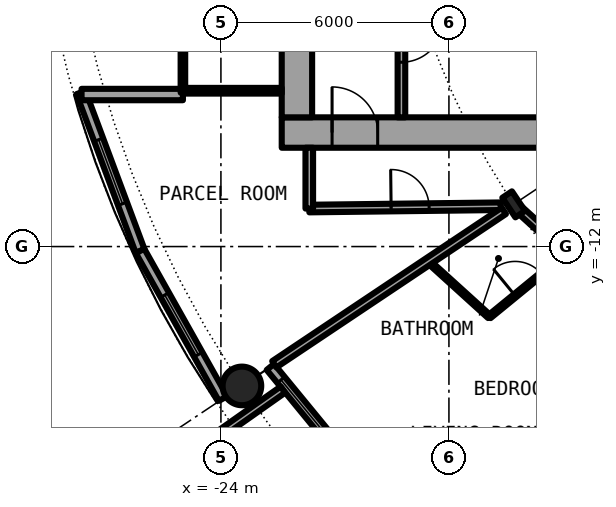
"""IFC4 building model, lengths in metres.
Left out: names, types, materials, properties, quantities, classifications, styles, units other than length and angle.
Written with IfcOpenShell. Run it as: python <this file> out.ifc"""

import sys

from ifc_helpers import new_model, si_unit, direction, frame, frame_2d, origin, origin_2d, place, context, subcontext, project, spatial, rectangle, hollow_circle, i_section, extrude, element, fill, save


model = new_model("IFC4")
c1 = context("Model", 3, precision=1e-05, world=origin(), true_north=direction((0.0, 1.0)))
c2 = subcontext(c1, "Body", "Model", "MODEL_VIEW")
j1 = project(units=[si_unit("LENGTHUNIT", "METRE"), si_unit("PLANEANGLEUNIT", "RADIAN")], contexts=[c1])
p1 = place(None, origin())
s1 = spatial("IfcSite", under=j1, at=p1, CompositionType="ELEMENT")
p2 = place(p1, origin())
s2 = spatial("IfcBuilding", under=s1, at=p2, CompositionType="ELEMENT")
p3 = place(p2, frame((0.0, 0.0, 28.9)))
s3 = spatial("IfcBuildingStorey", under=s2, at=p3, CompositionType="ELEMENT", Elevation=28.9)
p4 = place(p3, frame((-23.448, -15.667, 0.0), z_axis=(0.0, 0.0, 1.0), x_axis=(1.0, 0.0, 0.0)))
e1 = element("IfcColumn", 1, at=p4, inside=s3, PredefinedType="COLUMN", context=c2, shape_type="SweptSolid", body=[
    extrude(hollow_circle(Radius=0.508, WallThickness=0.05, at=origin_2d()), origin(), (0.0, 0.0, 1.0), 3.05),
])
p5 = place(p3, frame((-16.297, -10.889, 0.0), z_axis=(0.0, 0.0, 1.0), x_axis=(-0.831469612303, -0.55557023302, 0.0)))
e2 = element("IfcColumn", 2, at=p5, inside=s3, PredefinedType="COLUMN", context=c2, shape_type="SweptSolid", body=[
    extrude(i_section(OverallWidth=0.305, OverallDepth=0.62, WebThickness=0.021, FlangeThickness=0.04, FilletRadius=0.027, at=origin_2d()), origin(), (0.0, 0.0, 1.0), 3.05),
])
p6 = place(p3, frame((-22.699, -15.167, 0.0), z_axis=(0.0, 0.0, 1.0), x_axis=(0.634382322723, -0.773019449054, 0.0)))
e3 = element("IfcWall", 3, at=p6, inside=s3, PredefinedType="SOLIDWALL", context=c2, shape_type="SweptSolid", body=[
    extrude(rectangle(XDim=5.352, YDim=0.25, at=frame_2d((2.676, 0.0))), origin(), (0.0, 0.0, 1.0), 2.7),
])
p7 = place(p6, frame((0.441, 0.0, 0.3)))
e4 = element("IfcOpeningElement", 4, at=p7, cuts=e3, PredefinedType="OPENING", context=c2, shape_type="SweptSolid", body=[
    extrude(rectangle(XDim=1.8, YDim=2.1, at=frame_2d((0.9, 1.05))), frame((0.0, 0.135, 0.0), z_axis=(0.0, -1.0, 0.0), x_axis=(1.0, 0.0, 0.0)), (0.0, 0.0, 1.0), 0.27),
])
p8 = place(p6, frame((3.51, 0.0, 0.0)))
e5 = element("IfcOpeningElement", 5, at=p8, cuts=e3, PredefinedType="OPENING", context=c2, shape_type="SweptSolid", body=[
    extrude(rectangle(XDim=1.0, YDim=2.2, at=frame_2d((0.5, 1.1))), frame((0.0, 0.135, 0.0), z_axis=(0.0, -1.0, 0.0), x_axis=(1.0, 0.0, 0.0)), (0.0, 0.0, 1.0), 0.27),
])
p9 = place(p3, frame((-22.37, -15.765, -0.03), z_axis=(0.0, 0.0, 1.0), x_axis=(-0.817256123454, -0.576274612209, 0.0)))
e6 = element("IfcWall", 6, at=p9, inside=s3, PredefinedType="SOLIDWALL", context=c2, shape_type="SweptSolid", body=[
    extrude(rectangle(XDim=2.933, YDim=0.2, at=frame_2d((1.466, 0.0))), origin(), (0.0, 0.0, 1.0), 2.73),
])
p10 = place(p3, frame((-27.682, -7.945, 0.0), z_axis=(0.0, 0.0, 1.0), x_axis=(0.349247811493, -0.937030397675, 0.0)))
e7 = element("IfcWall", 7, at=p10, inside=s3, PredefinedType="SOLIDWALL", context=c2, shape_type="SweptSolid", body=[
    extrude(rectangle(XDim=4.452, YDim=0.25, at=frame_2d((2.226, 0.0))), origin(), (0.0, 0.0, 1.0), 2.7),
])
p11 = place(p10, frame((1.327, 0.0, 0.3)))
e8 = element("IfcOpeningElement", 8, at=p11, cuts=e7, PredefinedType="OPENING", context=c2, shape_type="SweptSolid", body=[
    extrude(rectangle(XDim=1.8, YDim=2.1, at=frame_2d((0.9, 1.05))), frame((0.0, 0.135, 0.0), z_axis=(0.0, -1.0, 0.0), x_axis=(1.0, 0.0, 0.0)), (0.0, 0.0, 1.0), 0.27),
])
p12 = place(p3, frame((-26.127, -12.117, 0.0), z_axis=(0.0, 0.0, 1.0), x_axis=(0.489696356642, -0.871893042919, 0.0)))
e9 = element("IfcWall", 9, at=p12, inside=s3, PredefinedType="SOLIDWALL", context=c2, shape_type="SweptSolid", body=[
    extrude(rectangle(XDim=4.454, YDim=0.25, at=frame_2d((2.227, 0.0))), origin(), (0.0, 0.0, 1.0), 2.7),
])
p13 = place(p12, frame((1.327, 0.0, 0.3)))
e10 = element("IfcOpeningElement", 10, at=p13, cuts=e9, PredefinedType="OPENING", context=c2, shape_type="SweptSolid", body=[
    extrude(rectangle(XDim=1.8, YDim=2.1, at=frame_2d((0.9, 1.05))), frame((0.0, 0.135, 0.0), z_axis=(0.0, -1.0, 0.0), x_axis=(1.0, 0.0, 0.0)), (0.0, 0.0, 1.0), 0.27),
])
p14 = place(p3, frame((-25.0, -8.0, 0.0), z_axis=(0.0, 0.0, 1.0), x_axis=(-1.0, 0.0, 0.0)))
e11 = element("IfcWall", 11, at=p14, inside=s3, PredefinedType="SOLIDWALL", context=c2, shape_type="SweptSolid", body=[
    extrude(rectangle(XDim=2.667, YDim=0.3, at=frame_2d((1.333, 0.0))), origin(), (0.0, 0.0, 1.0), 2.7),
])
p15 = place(p3, frame((-22.4, -9.0, 0.0), z_axis=(0.0, 0.0, 1.0), x_axis=(1.0, 0.0, 0.0)))
e12 = element("IfcWall", 12, at=p15, inside=s3, PredefinedType="SHEAR", context=c2, shape_type="SweptSolid", body=[
    extrude(rectangle(XDim=14.2, YDim=0.8, at=frame_2d((7.1, 0.0))), origin(), (0.0, 0.0, 1.0), 3.05),
])
p16 = place(p15, frame((1.325, 0.0, 0.0)))
e13 = element("IfcOpeningElement", 13, at=p16, cuts=e12, PredefinedType="OPENING", context=c2, shape_type="SweptSolid", body=[
    extrude(rectangle(XDim=1.2, YDim=2.3, at=frame_2d((0.6, 1.15))), frame((0.0, 0.41, 0.0), z_axis=(0.0, -1.0, 0.0), x_axis=(1.0, 0.0, 0.0)), (0.0, 0.0, 1.0), 0.82),
])
p17 = place(p3, frame((-22.0, -8.6, 0.0), z_axis=(0.0, 0.0, 1.0), x_axis=(0.0, 1.0, 0.0)))
e14 = element("IfcWall", 14, at=p17, inside=s3, PredefinedType="SHEAR", context=c2, shape_type="SweptSolid", body=[
    extrude(rectangle(XDim=17.2, YDim=0.8, at=frame_2d((8.6, 0.0))), origin(), (0.0, 0.0, 1.0), 3.05),
])
p18 = place(p17, frame((7.7, 0.0, 0.0)))
e15 = element("IfcOpeningElement", 15, at=p18, cuts=e14, PredefinedType="OPENING", context=c2, shape_type="SweptSolid", body=[
    extrude(rectangle(XDim=1.8, YDim=2.3, at=frame_2d((0.9, 1.15))), frame((0.0, 0.41, 0.0), z_axis=(0.0, -1.0, 0.0), x_axis=(1.0, 0.0, 0.0)), (0.0, 0.0, 1.0), 0.82),
])
p19 = place(p3, frame((-19.25, -1.575, 0.0), z_axis=(0.0, 0.0, 1.0), x_axis=(0.0, -1.0, 0.0)))
e16 = element("IfcWall", 16, at=p19, inside=s3, PredefinedType="SOLIDWALL", context=c2, shape_type="SweptSolid", body=[
    extrude(rectangle(XDim=7.025, YDim=0.2, at=frame_2d((3.513, 0.0))), origin(), (0.0, 0.0, 1.0), 2.7),
])
p20 = place(p19, frame((4.475, 0.0, 0.0)))
e17 = element("IfcOpeningElement", 17, at=p20, cuts=e16, PredefinedType="OPENING", context=c2, shape_type="SweptSolid", body=[
    extrude(rectangle(XDim=1.1, YDim=2.3, at=frame_2d((0.55, 1.15))), frame((0.0, 0.11, 0.0), z_axis=(0.0, -1.0, 0.0), x_axis=(1.0, 0.0, 0.0)), (0.0, 0.0, 1.0), 0.22),
])
p21 = place(p3, frame((-22.4, -7.9, 0.0), z_axis=(0.0, 0.0, 1.0), x_axis=(-1.0, 0.0, 0.0)))
e18 = element("IfcWall", 18, at=p21, inside=s3, PredefinedType="PARTITIONING", context=c2, shape_type="SweptSolid", body=[
    extrude(rectangle(XDim=2.54, YDim=0.15, at=frame_2d((1.27, 0.0))), origin(), (0.0, 0.0, 1.0), 2.7),
])
p22 = place(p3, frame((-25.0, 7.95, 0.0), z_axis=(0.0, 0.0, 1.0), x_axis=(0.0, -1.0, 0.0)))
e19 = element("IfcWall", 19, at=p22, inside=s3, PredefinedType="PARTITIONING", context=c2, shape_type="SweptSolid", body=[
    extrude(rectangle(XDim=15.9, YDim=0.12, at=frame_2d((7.95, 0.0))), origin(), (0.0, 0.0, 1.0), 2.7),
])
p23 = place(p22, frame((0.95, 0.0, 0.1)))
e20 = element("IfcOpeningElement", 20, at=p23, cuts=e19, PredefinedType="OPENING", context=c2, shape_type="SweptSolid", body=[
    extrude(rectangle(XDim=14.0, YDim=2.35, at=frame_2d((7.0, 1.175))), frame((0.0, 0.07, 0.0), z_axis=(0.0, -1.0, 0.0), x_axis=(1.0, 0.0, 0.0)), (0.0, 0.0, 1.0), 0.14),
])
p24 = place(p3, frame((-18.542, -12.389, 0.0), z_axis=(0.0, 0.0, 1.0), x_axis=(0.740836325503, -0.671685595212, 0.0)))
e21 = element("IfcWall", 21, at=p24, inside=s3, PredefinedType="PARTITIONING", context=c2, shape_type="SweptSolid", body=[
    extrude(rectangle(XDim=2.168, YDim=0.1, at=frame_2d((1.084, 0.0))), origin(), (0.0, 0.0, 1.0), 2.7),
])
p25 = place(p3, frame((-16.18, -10.994, 0.0), z_axis=(0.0, 0.0, 1.0), x_axis=(0.74089212117, -0.671624050186, 0.0)))
e22 = element("IfcWall", 22, at=p25, inside=s3, PredefinedType="PARTITIONING", context=c2, shape_type="SweptSolid", body=[
    extrude(rectangle(XDim=9.368, YDim=0.2, at=frame_2d((4.684, 0.0))), origin(), (0.0, 0.0, 1.0), 2.38),
])
p26 = place(p25, frame((3.153, 0.0, 0.0)))
e23 = element("IfcOpeningElement", 23, at=p26, cuts=e22, PredefinedType="OPENING", context=c2, shape_type="SweptSolid", body=[
    extrude(rectangle(XDim=1.0, YDim=2.3, at=frame_2d((0.5, 1.15))), frame((0.0, 0.11, 0.0), z_axis=(0.0, -1.0, 0.0), x_axis=(1.0, 0.0, 0.0)), (0.0, 0.0, 1.0), 0.22),
])
p27 = place(p3, frame((-21.675, -11.0, 0.0), z_axis=(0.0, 0.0, 1.0), x_axis=(0.999926652916, 0.012111514691, 0.0)))
e24 = element("IfcWall", 24, at=p27, inside=s3, PredefinedType="PARTITIONING", context=c2, shape_type="SweptSolid", body=[
    extrude(rectangle(XDim=5.04, YDim=0.2, at=frame_2d((2.52, 0.0))), origin(), (0.0, 0.0, 1.0), 2.7),
])
p28 = place(p27, frame((2.154, 0.0, 0.0)))
e25 = element("IfcOpeningElement", 25, at=p28, cuts=e24, PredefinedType="OPENING", context=c2, shape_type="SweptSolid", body=[
    extrude(rectangle(XDim=1.0, YDim=2.3, at=frame_2d((0.5, 1.15))), frame((0.0, 0.11, 0.0), z_axis=(0.0, -1.0, 0.0), x_axis=(1.0, 0.0, 0.0)), (0.0, 0.0, 1.0), 0.22),
])
p29 = place(p3, frame((-22.595, -15.097, 0.0), z_axis=(0.0, 0.0, 1.0), x_axis=(0.831465568067, 0.555576285599, 0.0)))
e26 = element("IfcWall", 26, at=p29, inside=s3, PredefinedType="PARTITIONING", context=c2, shape_type="SweptSolid", body=[
    extrude(rectangle(XDim=7.264, YDim=0.2, at=frame_2d((3.632, 0.0))), origin(), (0.0, 0.0, 1.0), 2.7),
])
p30 = place(p3, frame((-17.219, -21.023, 0.0), z_axis=(0.0, 0.0, 1.0), x_axis=(0.633664062855, 0.773608334654, 0.0)))
e27 = element("IfcWall", 27, at=p30, inside=s3, PredefinedType="PARTITIONING", context=c2, shape_type="SweptSolid", body=[
    extrude(rectangle(XDim=8.138, YDim=0.1, at=frame_2d((4.069, 0.0))), origin(), (0.0, 0.0, 1.0), 2.7),
])
p31 = place(p30, frame((6.377, 0.0, 0.0)))
e28 = element("IfcOpeningElement", 28, at=p31, cuts=e27, PredefinedType="OPENING", context=c2, shape_type="SweptSolid", body=[
    extrude(rectangle(XDim=0.9, YDim=2.3, at=frame_2d((0.45, 1.15))), frame((0.0, 0.06, 0.0), z_axis=(0.0, -1.0, 0.0), x_axis=(1.0, 0.0, 0.0)), (0.0, 0.0, 1.0), 0.12),
])
p32 = place(p30, frame((2.308, 0.0, 0.0)))
e29 = element("IfcOpeningElement", 29, at=p32, cuts=e27, PredefinedType="OPENING", context=c2, shape_type="SweptSolid", body=[
    extrude(rectangle(XDim=0.9, YDim=2.3, at=frame_2d((0.45, 1.15))), frame((0.0, 0.06, 0.0), z_axis=(0.0, -1.0, 0.0), x_axis=(1.0, 0.0, 0.0)), (0.0, 0.0, 1.0), 0.12),
])
p33 = place(p3, frame((-16.936, -13.845, 0.0), z_axis=(0.0, 0.0, 1.0), x_axis=(0.774162545943, 0.632986850147, 0.0)))
e30 = element("IfcWall", 30, at=p33, inside=s3, PredefinedType="PARTITIONING", context=c2, shape_type="SweptSolid", body=[
    extrude(rectangle(XDim=2.649, YDim=0.1, at=frame_2d((1.325, 0.0))), origin(), (0.0, 0.0, 1.0), 2.7),
])
p34 = place(p33, frame((0.875, 0.0, 0.0)))
e31 = element("IfcOpeningElement", 31, at=p34, cuts=e30, PredefinedType="OPENING", context=c2, shape_type="SweptSolid", body=[
    extrude(rectangle(XDim=0.9, YDim=2.3, at=frame_2d((0.45, 1.15))), frame((0.0, 0.06, 0.0), z_axis=(0.0, -1.0, 0.0), x_axis=(1.0, 0.0, 0.0)), (0.0, 0.0, 1.0), 0.12),
])
p35 = place(p3, frame((-21.675, -11.0, 0.0), z_axis=(0.0, 0.0, 1.0), x_axis=(0.0, 1.0, 0.0)))
e32 = element("IfcWall", 32, at=p35, inside=s3, PredefinedType="PARTITIONING", context=c2, shape_type="SweptSolid", body=[
    extrude(rectangle(XDim=1.6, YDim=0.2, at=frame_2d((0.8, 0.0))), origin(), (0.0, 0.0, 1.0), 2.7),
])
p36 = place(p7, origin())
e33 = element("IfcWindow", 33, at=p36, inside=s3, PartitioningType="SINGLE_PANEL", PredefinedType="WINDOW", context=c2, shape_type="SweptSolid", body=[
    extrude(rectangle(XDim=1.8, YDim=2.1, at=frame_2d((0.9, 1.05))), frame((0.0, 0.03, 0.0), z_axis=(0.0, -1.0, 0.0), x_axis=(1.0, 0.0, 0.0)), (0.0, 0.0, 1.0), 0.06),
])
fill(e4, e33)
p37 = place(p11, origin())
e34 = element("IfcWindow", 34, at=p37, inside=s3, PartitioningType="SINGLE_PANEL", PredefinedType="WINDOW", context=c2, shape_type="SweptSolid", body=[
    extrude(rectangle(XDim=1.8, YDim=2.1, at=frame_2d((0.9, 1.05))), frame((0.0, 0.03, 0.0), z_axis=(0.0, -1.0, 0.0), x_axis=(1.0, 0.0, 0.0)), (0.0, 0.0, 1.0), 0.06),
])
fill(e8, e34)
p38 = place(p13, origin())
e35 = element("IfcWindow", 35, at=p38, inside=s3, PartitioningType="SINGLE_PANEL", PredefinedType="WINDOW", context=c2, shape_type="SweptSolid", body=[
    extrude(rectangle(XDim=1.8, YDim=2.1, at=frame_2d((0.9, 1.05))), frame((0.0, 0.03, 0.0), z_axis=(0.0, -1.0, 0.0), x_axis=(1.0, 0.0, 0.0)), (0.0, 0.0, 1.0), 0.06),
])
fill(e10, e35)
p39 = place(p20, origin())
e36 = element("IfcDoor", 36, at=p39, inside=s3, OperationType="SINGLE_SWING_LEFT", PredefinedType="DOOR", context=c2, shape_type="SweptSolid", body=[
    extrude(rectangle(XDim=1.1, YDim=2.3, at=frame_2d((0.55, 1.15))), frame((0.0, 0.025, 0.0), z_axis=(0.0, -1.0, 0.0), x_axis=(1.0, 0.0, 0.0)), (0.0, 0.0, 1.0), 0.05),
])
fill(e17, e36)
p40 = place(p16, origin())
e37 = element("IfcDoor", 37, at=p40, inside=s3, OperationType="SINGLE_SWING_RIGHT", PredefinedType="DOOR", context=c2, shape_type="SweptSolid", body=[
    extrude(rectangle(XDim=1.2, YDim=2.3, at=frame_2d((0.6, 1.15))), frame((0.0, 0.025, 0.0), z_axis=(0.0, -1.0, 0.0), x_axis=(1.0, 0.0, 0.0)), (0.0, 0.0, 1.0), 0.05),
])
fill(e13, e37)
p41 = place(p23, origin())
e38 = element("IfcWindow", 38, at=p41, inside=s3, PartitioningType="SINGLE_PANEL", PredefinedType="WINDOW", context=c2, shape_type="SweptSolid", body=[
    extrude(rectangle(XDim=14.0, YDim=2.35, at=frame_2d((7.0, 1.175))), frame((0.0, 0.03, 0.0), z_axis=(0.0, -1.0, 0.0), x_axis=(1.0, 0.0, 0.0)), (0.0, 0.0, 1.0), 0.06),
])
fill(e20, e38)
p42 = place(p34, origin())
e39 = element("IfcDoor", 39, at=p42, inside=s3, OperationType="SINGLE_SWING_LEFT", PredefinedType="DOOR", context=c2, shape_type="SweptSolid", body=[
    extrude(rectangle(XDim=0.9, YDim=2.3, at=frame_2d((0.45, 1.15))), frame((0.0, 0.025, 0.0), z_axis=(0.0, -1.0, 0.0), x_axis=(1.0, 0.0, 0.0)), (0.0, 0.0, 1.0), 0.05),
])
fill(e31, e39)
p43 = place(p28, origin())
e40 = element("IfcDoor", 40, at=p43, inside=s3, OperationType="SINGLE_SWING_RIGHT", PredefinedType="DOOR", context=c2, shape_type="SweptSolid", body=[
    extrude(rectangle(XDim=1.0, YDim=2.3, at=frame_2d((0.5, 1.15))), frame((0.0, 0.025, 0.0), z_axis=(0.0, -1.0, 0.0), x_axis=(1.0, 0.0, 0.0)), (0.0, 0.0, 1.0), 0.05),
])
fill(e25, e40)
save(model, sys.argv[1])
